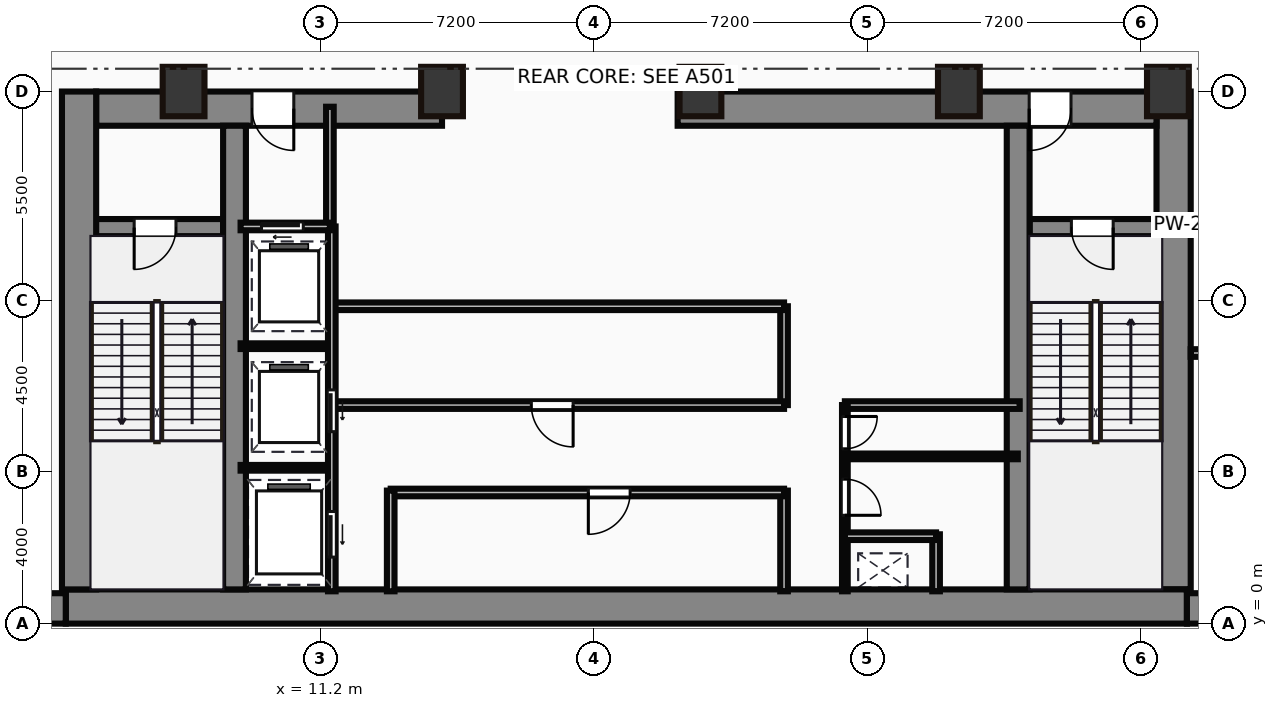
"""IFC4 building model, lengths in metres.
Left out: names, types, materials, properties, quantities, classifications, styles, units other than length and angle.
Written with IfcOpenShell. Run it as: python <this file> out.ifc"""

import sys

from ifc_helpers import new_model, si_unit, direction, frame, frame_2d, origin, origin_2d, place, context, subcontext, project, spatial, rectangle, hollow_rectangle, extrude, source, transform, mapped, element, fill, save


model = new_model("IFC4")
c1 = context("Model", 3, precision=1e-05, world=origin(), true_north=direction((0.0, 1.0)))
c2 = subcontext(c1, "Body", "Model", "MODEL_VIEW")
j1 = project(units=[si_unit("LENGTHUNIT", "METRE"), si_unit("PLANEANGLEUNIT", "RADIAN")], contexts=[c1])
p1 = place(None, origin())
s1 = spatial("IfcSite", under=j1, at=p1, CompositionType="ELEMENT")
p2 = place(p1, origin())
s2 = spatial("IfcBuilding", under=s1, at=p2, CompositionType="ELEMENT")
p3 = place(p2, frame((0.0, 0.0, -5.0)))
s3 = spatial("IfcBuildingStorey", under=s2, at=p3, CompositionType="ELEMENT", Elevation=-5.0)
m1 = source(origin(), c2, "Body", "SweptSolid", [
    extrude(rectangle(XDim=4.5, YDim=0.8, at=frame_2d((2.25, 0.0))), origin(), (0.0, 0.0, 1.0), 5.0),
])
p4 = place(p3, frame((0.0, 0.4, 0.0), z_axis=(0.0, 0.0, 1.0), x_axis=(1.0, 0.0, 0.0)))
e1 = element("IfcWall", 1, at=p4, inside=s3, PredefinedType="USERDEFINED", context=c2, shape_type="MappedRepresentation", body=[
    mapped(m1, transform((0.0, 0.0, 0.0))),
])
m2 = source(origin(), c2, "Body", "SweptSolid", [
    extrude(rectangle(XDim=48.0, YDim=0.8, at=frame_2d((24.0, 0.0))), origin(), (0.0, 0.0, 1.0), 5.0),
])
p5 = place(p3, frame((34.0, 0.4, 0.0), z_axis=(0.0, 0.0, 1.0), x_axis=(1.0, 0.0, 0.0)))
e2 = element("IfcWall", 2, at=p5, inside=s3, PredefinedType="USERDEFINED", context=c2, shape_type="MappedRepresentation", body=[
    mapped(m2, transform((0.0, 0.0, 0.0))),
])
m3 = source(origin(), c2, "Body", "SweptSolid", [
    extrude(rectangle(XDim=29.5, YDim=0.9, at=frame_2d((14.75, 0.0))), origin(), (0.0, 0.0, 1.0), 5.0),
])
p6 = place(p3, frame((4.5, 0.45, 0.0), z_axis=(0.0, 0.0, 1.0), x_axis=(1.0, 0.0, 0.0)))
e3 = element("IfcWall", 3, at=p6, inside=s3, PredefinedType="SHEAR", context=c2, shape_type="MappedRepresentation", body=[
    mapped(m3, transform((0.0, 0.0, 0.0))),
])
m4 = source(origin(), c2, "Body", "SweptSolid", [
    extrude(rectangle(XDim=13.1, YDim=0.9, at=frame_2d((6.55, 0.0))), origin(), (0.0, 0.0, 1.0), 5.0),
])
for number, where, z_axis, x_axis in (
    (4, (4.85, 0.9, 0.0), (0.0, 0.0, 1.0), (0.0, 1.0, 0.0)),
    (5, (33.65, 0.9, 0.0), (0.0, 0.0, 1.0), (0.0, 1.0, 0.0)),
):
    element("IfcWall", number, at=place(p3, frame(where, z_axis=z_axis, x_axis=x_axis)), inside=s3, PredefinedType="SHEAR", context=c2, shape_type="MappedRepresentation", body=[
        mapped(m4, transform((0.0, 0.0, 0.0))),
    ])
m5 = source(origin(), c2, "Body", "SweptSolid", [
    extrude(rectangle(XDim=9.1, YDim=0.9, at=frame_2d((4.55, 0.0))), origin(), (0.0, 0.0, 1.0), 5.0),
])
p7 = place(p3, frame((5.3, 13.55, 0.0), z_axis=(0.0, 0.0, 1.0), x_axis=(1.0, 0.0, 0.0)))
e6 = element("IfcWall", 6, at=p7, inside=s3, PredefinedType="SHEAR", context=c2, shape_type="MappedRepresentation", body=[
    mapped(m5, transform((0.0, 0.0, 0.0))),
])
p8 = place(p7, frame((4.1, 0.0, 0.0)))
e7 = element("IfcOpeningElement", 7, at=p8, cuts=e6, PredefinedType="OPENING", context=c2, shape_type="SweptSolid", body=[
    extrude(rectangle(XDim=1.1, YDim=2.15, at=frame_2d((0.55, 1.075))), frame((0.0, 0.46, 0.0), z_axis=(0.0, -1.0, 0.0), x_axis=(1.0, 0.0, 0.0)), (0.0, 0.0, 1.0), 0.92),
])
m6 = source(origin(), c2, "Body", "SweptSolid", [
    extrude(rectangle(XDim=12.6, YDim=0.9, at=frame_2d((6.3, 0.0))), origin(), (0.0, 0.0, 1.0), 5.0),
])
p9 = place(p3, frame((20.6, 13.55, 0.0), z_axis=(0.0, 0.0, 1.0), x_axis=(1.0, 0.0, 0.0)))
e8 = element("IfcWall", 8, at=p9, inside=s3, PredefinedType="SHEAR", context=c2, shape_type="MappedRepresentation", body=[
    mapped(m6, transform((0.0, 0.0, 0.0))),
])
p10 = place(p9, frame((9.25, 0.0, 0.0)))
e9 = element("IfcOpeningElement", 9, at=p10, cuts=e8, PredefinedType="OPENING", context=c2, shape_type="SweptSolid", body=[
    extrude(rectangle(XDim=1.1, YDim=2.15, at=frame_2d((0.55, 1.075))), frame((0.0, 0.46, 0.0), z_axis=(0.0, -1.0, 0.0), x_axis=(1.0, 0.0, 0.0)), (0.0, 0.0, 1.0), 0.92),
])
m7 = source(origin(), c2, "Body", "SweptSolid", [
    extrude(rectangle(XDim=12.2, YDim=0.6, at=frame_2d((6.1, 0.0))), origin(), (0.0, 0.0, 1.0), 5.0),
])
for number, where, z_axis, x_axis in (
    (10, (8.94, 0.9, 0.0), (0.0, 0.0, 1.0), (0.0, 1.0, 0.0)),
    (11, (29.56, 0.9, 0.0), (0.0, 0.0, 1.0), (0.0, 1.0, 0.0)),
):
    element("IfcWall", number, at=place(p3, frame(where, z_axis=z_axis, x_axis=x_axis)), inside=s3, PredefinedType="SHEAR", context=c2, shape_type="MappedRepresentation", body=[
        mapped(m7, transform((0.0, 0.0, 0.0))),
    ])
m8 = source(origin(), c2, "Body", "SweptSolid", [
    extrude(rectangle(XDim=3.39, YDim=0.45, at=frame_2d((1.695, 0.0))), origin(), (0.0, 0.0, 1.0), 5.0),
])
p11 = place(p3, frame((5.25, 10.42, 0.0), z_axis=(0.0, 0.0, 1.0), x_axis=(1.0, 0.0, 0.0)))
e12 = element("IfcWall", 12, at=p11, inside=s3, PredefinedType="SHEAR", context=c2, shape_type="MappedRepresentation", body=[
    mapped(m8, transform((0.0, 0.0, 0.0))),
])
p12 = place(p11, frame((1.05, 0.0, 0.0)))
e13 = element("IfcOpeningElement", 13, at=p12, cuts=e12, PredefinedType="OPENING", context=c2, shape_type="SweptSolid", body=[
    extrude(rectangle(XDim=1.1, YDim=2.15, at=frame_2d((0.55, 1.075))), frame((0.0, 0.235, 0.0), z_axis=(0.0, -1.0, 0.0), x_axis=(1.0, 0.0, 0.0)), (0.0, 0.0, 1.0), 0.47),
])
p13 = place(p3, frame((29.86, 10.42, 0.0), z_axis=(0.0, 0.0, 1.0), x_axis=(1.0, 0.0, 0.0)))
e14 = element("IfcWall", 14, at=p13, inside=s3, PredefinedType="SHEAR", context=c2, shape_type="MappedRepresentation", body=[
    mapped(m8, transform((0.0, 0.0, 0.0))),
])
p14 = place(p13, frame((1.1, 0.0, 0.0)))
e15 = element("IfcOpeningElement", 15, at=p14, cuts=e14, PredefinedType="OPENING", context=c2, shape_type="SweptSolid", body=[
    extrude(rectangle(XDim=1.1, YDim=2.15, at=frame_2d((0.55, 1.075))), frame((0.0, 0.235, 0.0), z_axis=(0.0, -1.0, 0.0), x_axis=(1.0, 0.0, 0.0)), (0.0, 0.0, 1.0), 0.47),
])
m9 = source(origin(), c2, "Body", "SweptSolid", [
    extrude(hollow_rectangle(XDim=1.1, YDim=1.3, WallThickness=0.055, at=origin_2d()), origin(), (0.0, 0.0, 1.0), 5.0),
])
for number, where, z_axis, x_axis in (
    (16, (7.6, 14.0, 0.0), (0.0, 0.0, 1.0), (1.0, 0.0, 0.0)),
    (17, (14.4, 14.0, 0.0), (0.0, 0.0, 1.0), (1.0, 0.0, 0.0)),
    (18, (21.2, 14.0, 0.0), (0.0, 0.0, 1.0), (1.0, 0.0, 0.0)),
    (19, (28.0, 14.0, 0.0), (0.0, 0.0, 1.0), (1.0, 0.0, 0.0)),
    (20, (33.5, 14.0, 0.0), (0.0, 0.0, 1.0), (1.0, 0.0, 0.0)),
):
    element("IfcColumn", number, at=place(p3, frame(where, z_axis=z_axis, x_axis=x_axis)), inside=s3, PredefinedType="PILASTER", context=c2, shape_type="MappedRepresentation", body=[
        mapped(m9, transform((0.0, 0.0, 0.0))),
    ])
m10 = source(origin(), c2, "Body", "SweptSolid", [
    extrude(rectangle(XDim=3.18, YDim=0.2, at=frame_2d((1.59, 0.0))), origin(), (0.0, 0.0, 1.0), 4.7),
])
p15 = place(p3, frame((11.45, 10.42, 0.0), z_axis=(0.0, 0.0, 1.0), x_axis=(0.0, 1.0, 0.0)))
e21 = element("IfcWall", 21, at=p15, inside=s3, PredefinedType="PARTITIONING", context=c2, shape_type="MappedRepresentation", body=[
    mapped(m10, transform((0.0, 0.0, 0.0))),
])
m11 = source(origin(), c2, "Body", "SweptSolid", [
    extrude(rectangle(XDim=2.35, YDim=0.2, at=frame_2d((1.175, 0.0))), origin(), (0.0, 0.0, 1.0), 4.7),
])
p16 = place(p3, frame((9.1, 10.45, 0.0), z_axis=(0.0, 0.0, 1.0), x_axis=(1.0, 0.0, 0.0)))
e22 = element("IfcWall", 22, at=p16, inside=s3, PredefinedType="PARTITIONING", context=c2, shape_type="MappedRepresentation", body=[
    mapped(m11, transform((0.0, 0.0, 0.0))),
])
p17 = place(p16, frame((0.55, 0.0, 0.0)))
e23 = element("IfcOpeningElement", 23, at=p17, cuts=e22, PredefinedType="OPENING", context=c2, shape_type="SweptSolid", body=[
    extrude(rectangle(XDim=1.1, YDim=2.15, at=frame_2d((0.55, 1.075))), frame((0.0, 0.11, 0.0), z_axis=(0.0, -1.0, 0.0), x_axis=(1.0, 0.0, 0.0)), (0.0, 0.0, 1.0), 0.22),
])
m12 = source(origin(), c2, "Body", "SweptSolid", [
    extrude(rectangle(XDim=9.6, YDim=0.2, at=frame_2d((4.8, 0.0))), origin(), (0.0, 0.0, 1.0), 4.7),
])
p18 = place(p3, frame((11.5, 0.85, 0.0), z_axis=(0.0, 0.0, 1.0), x_axis=(0.0, 1.0, 0.0)))
e24 = element("IfcWall", 24, at=p18, inside=s3, PredefinedType="PARTITIONING", context=c2, shape_type="MappedRepresentation", body=[
    mapped(m12, transform((0.0, 0.0, 0.0))),
])
p19 = place(p18, frame((4.2, 0.0, 0.0)))
e25 = element("IfcOpeningElement", 25, at=p19, cuts=e24, PredefinedType="OPENING", context=c2, shape_type="SweptSolid", body=[
    extrude(rectangle(XDim=1.1, YDim=2.15, at=frame_2d((0.55, 1.075))), frame((0.0, 0.11, 0.0), z_axis=(0.0, -1.0, 0.0), x_axis=(1.0, 0.0, 0.0)), (0.0, 0.0, 1.0), 0.22),
])
p20 = place(p18, frame((0.9, 0.0, 0.0)))
e26 = element("IfcOpeningElement", 26, at=p20, cuts=e24, PredefinedType="OPENING", context=c2, shape_type="SweptSolid", body=[
    extrude(rectangle(XDim=1.2, YDim=2.15, at=frame_2d((0.6, 1.075))), frame((0.0, 0.11, 0.0), z_axis=(0.0, -1.0, 0.0), x_axis=(1.0, 0.0, 0.0)), (0.0, 0.0, 1.0), 0.22),
])
m13 = source(origin(), c2, "Body", "SweptSolid", [
    extrude(rectangle(XDim=2.4, YDim=0.15, at=frame_2d((1.2, 0.0))), origin(), (0.0, 0.0, 1.0), 4.7),
])
for number, where, z_axis, x_axis in (
    (27, (9.1, 4.1, 0.0), (0.0, 0.0, 1.0), (1.0, 0.0, 0.0)),
    (28, (9.1, 7.3, 0.0), (0.0, 0.0, 1.0), (1.0, 0.0, 0.0)),
):
    element("IfcWall", number, at=place(p3, frame(where, z_axis=z_axis, x_axis=x_axis)), inside=s3, PredefinedType="PARTITIONING", context=c2, shape_type="MappedRepresentation", body=[
        mapped(m13, transform((0.0, 0.0, 0.0))),
    ])
m14 = source(origin(), c2, "Body", "SweptSolid", [
    extrude(rectangle(XDim=2.65, YDim=0.2, at=frame_2d((1.325, 0.0))), origin(), (0.0, 0.0, 1.0), 4.7),
])
p21 = place(p3, frame((13.05, 0.85, 0.0), z_axis=(0.0, 0.0, 1.0), x_axis=(0.0, 1.0, 0.0)))
e29 = element("IfcWall", 29, at=p21, inside=s3, PredefinedType="PARTITIONING", context=c2, shape_type="MappedRepresentation", body=[
    mapped(m14, transform((0.0, 0.0, 0.0))),
])
m15 = source(origin(), c2, "Body", "SweptSolid", [
    extrude(rectangle(XDim=10.35, YDim=0.2, at=frame_2d((5.175, 0.0))), origin(), (0.0, 0.0, 1.0), 4.7),
])
p22 = place(p3, frame((13.05, 3.45, 0.0), z_axis=(0.0, 0.0, 1.0), x_axis=(1.0, 0.0, 0.0)))
e30 = element("IfcWall", 30, at=p22, inside=s3, PredefinedType="PARTITIONING", context=c2, shape_type="MappedRepresentation", body=[
    mapped(m15, transform((0.0, 0.0, 0.0))),
])
p23 = place(p22, frame((5.2, 0.0, 0.0)))
e31 = element("IfcOpeningElement", 31, at=p23, cuts=e30, PredefinedType="OPENING", context=c2, shape_type="SweptSolid", body=[
    extrude(rectangle(XDim=1.1, YDim=2.15, at=frame_2d((0.55, 1.075))), frame((0.0, 0.11, 0.0), z_axis=(0.0, -1.0, 0.0), x_axis=(1.0, 0.0, 0.0)), (0.0, 0.0, 1.0), 0.22),
])
p24 = place(p3, frame((23.4, 0.85, 0.0), z_axis=(0.0, 0.0, 1.0), x_axis=(0.0, 1.0, 0.0)))
e32 = element("IfcWall", 32, at=p24, inside=s3, PredefinedType="PARTITIONING", context=c2, shape_type="MappedRepresentation", body=[
    mapped(m14, transform((0.0, 0.0, 0.0))),
])
m16 = source(origin(), c2, "Body", "SweptSolid", [
    extrude(rectangle(XDim=11.85, YDim=0.2, at=frame_2d((5.925, 0.0))), origin(), (0.0, 0.0, 1.0), 4.7),
])
p25 = place(p3, frame((11.55, 5.75, 0.0), z_axis=(0.0, 0.0, 1.0), x_axis=(1.0, 0.0, 0.0)))
e33 = element("IfcWall", 33, at=p25, inside=s3, PredefinedType="PARTITIONING", context=c2, shape_type="MappedRepresentation", body=[
    mapped(m16, transform((0.0, 0.0, 0.0))),
])
p26 = place(p25, frame((5.2, 0.0, 0.0)))
e34 = element("IfcOpeningElement", 34, at=p26, cuts=e33, PredefinedType="OPENING", context=c2, shape_type="SweptSolid", body=[
    extrude(rectangle(XDim=1.1, YDim=2.15, at=frame_2d((0.55, 1.075))), frame((0.0, 0.11, 0.0), z_axis=(0.0, -1.0, 0.0), x_axis=(1.0, 0.0, 0.0)), (0.0, 0.0, 1.0), 0.22),
])
p27 = place(p3, frame((11.55, 8.35, 0.0), z_axis=(0.0, 0.0, 1.0), x_axis=(1.0, 0.0, 0.0)))
e35 = element("IfcWall", 35, at=p27, inside=s3, PredefinedType="PARTITIONING", context=c2, shape_type="MappedRepresentation", body=[
    mapped(m16, transform((0.0, 0.0, 0.0))),
])
m17 = source(origin(), c2, "Body", "SweptSolid", [
    extrude(rectangle(XDim=2.6, YDim=0.2, at=frame_2d((1.3, 0.0))), origin(), (0.0, 0.0, 1.0), 4.7),
])
p28 = place(p3, frame((23.4, 5.75, 0.0), z_axis=(0.0, 0.0, 1.0), x_axis=(0.0, 1.0, 0.0)))
e36 = element("IfcWall", 36, at=p28, inside=s3, PredefinedType="PARTITIONING", context=c2, shape_type="MappedRepresentation", body=[
    mapped(m17, transform((0.0, 0.0, 0.0))),
])
m18 = source(origin(), c2, "Body", "SweptSolid", [
    extrude(rectangle(XDim=4.9, YDim=0.15, at=frame_2d((2.45, 0.0))), origin(), (0.0, 0.0, 1.0), 4.7),
])
p29 = place(p3, frame((25.0, 0.85, 0.0), z_axis=(0.0, 0.0, 1.0), x_axis=(0.0, 1.0, 0.0)))
e37 = element("IfcWall", 37, at=p29, inside=s3, PredefinedType="PARTITIONING", context=c2, shape_type="MappedRepresentation", body=[
    mapped(m18, transform((0.0, 0.0, 0.0))),
])
p30 = place(p29, frame((2.0, 0.0, 0.0)))
e38 = element("IfcOpeningElement", 38, at=p30, cuts=e37, PredefinedType="OPENING", context=c2, shape_type="SweptSolid", body=[
    extrude(rectangle(XDim=0.95, YDim=2.15, at=frame_2d((0.475, 1.075))), frame((0.0, 0.085, 0.0), z_axis=(0.0, -1.0, 0.0), x_axis=(1.0, 0.0, 0.0)), (0.0, 0.0, 1.0), 0.17),
])
p31 = place(p29, frame((3.75, 0.0, 0.0)))
e39 = element("IfcOpeningElement", 39, at=p31, cuts=e37, PredefinedType="OPENING", context=c2, shape_type="SweptSolid", body=[
    extrude(rectangle(XDim=0.85, YDim=2.15, at=frame_2d((0.425, 1.075))), frame((0.0, 0.085, 0.0), z_axis=(0.0, -1.0, 0.0), x_axis=(1.0, 0.0, 0.0)), (0.0, 0.0, 1.0), 0.17),
])
m19 = source(origin(), c2, "Body", "SweptSolid", [
    extrude(rectangle(XDim=4.6, YDim=0.2, at=frame_2d((2.3, 0.0))), origin(), (0.0, 0.0, 1.0), 4.7),
])
p32 = place(p3, frame((25.0, 5.75, 0.0), z_axis=(0.0, 0.0, 1.0), x_axis=(1.0, 0.0, 0.0)))
e40 = element("IfcWall", 40, at=p32, inside=s3, PredefinedType="PARTITIONING", context=c2, shape_type="MappedRepresentation", body=[
    mapped(m19, transform((0.0, 0.0, 0.0))),
])
m20 = source(origin(), c2, "Body", "SweptSolid", [
    extrude(rectangle(XDim=2.4, YDim=0.2, at=frame_2d((1.2, 0.0))), origin(), (0.0, 0.0, 1.0), 4.7),
])
p33 = place(p3, frame((25.0, 2.3, 0.0), z_axis=(0.0, 0.0, 1.0), x_axis=(1.0, 0.0, 0.0)))
e41 = element("IfcWall", 41, at=p33, inside=s3, PredefinedType="PARTITIONING", context=c2, shape_type="MappedRepresentation", body=[
    mapped(m20, transform((0.0, 0.0, 0.0))),
])
m21 = source(origin(), c2, "Body", "SweptSolid", [
    extrude(rectangle(XDim=1.5, YDim=0.2, at=frame_2d((0.75, 0.0))), origin(), (0.0, 0.0, 1.0), 4.7),
])
p34 = place(p3, frame((27.4, 0.85, 0.0), z_axis=(0.0, 0.0, 1.0), x_axis=(0.0, 1.0, 0.0)))
e42 = element("IfcWall", 42, at=p34, inside=s3, PredefinedType="PARTITIONING", context=c2, shape_type="MappedRepresentation", body=[
    mapped(m21, transform((0.0, 0.0, 0.0))),
])
m22 = source(origin(), c2, "Body", "SweptSolid", [
    extrude(rectangle(XDim=4.55, YDim=0.15, at=frame_2d((2.275, 0.0))), origin(), (0.0, 0.0, 1.0), 4.7),
])
p35 = place(p3, frame((25.0, 4.4, 0.0), z_axis=(0.0, 0.0, 1.0), x_axis=(1.0, 0.0, 0.0)))
e43 = element("IfcWall", 43, at=p35, inside=s3, PredefinedType="PARTITIONING", context=c2, shape_type="MappedRepresentation", body=[
    mapped(m22, transform((0.0, 0.0, 0.0))),
])
m23 = source(origin(), c2, "Body", "SweptSolid", [
    extrude(rectangle(XDim=23.85, YDim=0.2, at=frame_2d((11.925, 0.0))), origin(), (0.0, 0.0, 1.0), 4.7),
])
p36 = place(p3, frame((34.1, 7.12, 0.0), z_axis=(0.0, 0.0, 1.0), x_axis=(1.0, 0.0, 0.0)))
e44 = element("IfcWall", 44, at=p36, inside=s3, PredefinedType="PARTITIONING", context=c2, shape_type="MappedRepresentation", body=[
    mapped(m23, transform((0.0, 0.0, 0.0))),
])
p37 = place(p36, frame((10.5, 0.0, 0.0)))
e45 = element("IfcOpeningElement", 45, at=p37, cuts=e44, PredefinedType="OPENING", context=c2, shape_type="SweptSolid", body=[
    extrude(rectangle(XDim=1.1, YDim=2.15, at=frame_2d((0.55, 1.075))), frame((0.0, 0.11, 0.0), z_axis=(0.0, -1.0, 0.0), x_axis=(1.0, 0.0, 0.0)), (0.0, 0.0, 1.0), 0.22),
])
m24 = source(origin(), c2, "Body", "SweptSolid", [
    extrude(rectangle(XDim=1.1, YDim=2.15, at=frame_2d((0.55, 1.075))), frame((0.0, 0.025, 0.0), z_axis=(0.0, -1.0, 0.0), x_axis=(1.0, 0.0, 0.0)), (0.0, 0.0, 1.0), 0.05),
])
p38 = place(p12, frame((1.1, 0.0, 0.0), z_axis=(0.0, 0.0, 1.0), x_axis=(-1.0, 0.0, 0.0)))
e46 = element("IfcDoor", 46, at=p38, inside=s3, OperationType="SINGLE_SWING_LEFT", PredefinedType="DOOR", context=c2, shape_type="MappedRepresentation", body=[
    mapped(m24, transform((0.0, 0.0, 0.0))),
])
fill(e13, e46)
p39 = place(p14, frame((1.1, 0.0, 0.0), z_axis=(0.0, 0.0, 1.0), x_axis=(-1.0, 0.0, 0.0)))
e47 = element("IfcDoor", 47, at=p39, inside=s3, OperationType="SINGLE_SWING_RIGHT", PredefinedType="DOOR", context=c2, shape_type="MappedRepresentation", body=[
    mapped(m24, transform((0.0, 0.0, 0.0))),
])
fill(e15, e47)
p40 = place(p8, origin())
e48 = element("IfcDoor", 48, at=p40, inside=s3, OperationType="SINGLE_SWING_RIGHT", PredefinedType="DOOR", context=c2, shape_type="MappedRepresentation", body=[
    mapped(m24, transform((0.0, 0.0, 0.0))),
])
fill(e7, e48)
p41 = place(p10, origin())
e49 = element("IfcDoor", 49, at=p41, inside=s3, OperationType="SINGLE_SWING_LEFT", PredefinedType="DOOR", context=c2, shape_type="MappedRepresentation", body=[
    mapped(m24, transform((0.0, 0.0, 0.0))),
])
fill(e9, e49)
p42 = place(p17, origin())
e50 = element("IfcDoor", 50, at=p42, inside=s3, OperationType="SLIDING_TO_LEFT", PredefinedType="DOOR", context=c2, shape_type="MappedRepresentation", body=[
    mapped(m24, transform((0.0, 0.0, 0.0))),
])
fill(e23, e50)
p43 = place(p19, frame((1.1, 0.0, 0.0), z_axis=(0.0, 0.0, 1.0), x_axis=(-1.0, 0.0, 0.0)))
e51 = element("IfcDoor", 51, at=p43, inside=s3, OperationType="SLIDING_TO_LEFT", PredefinedType="DOOR", context=c2, shape_type="MappedRepresentation", body=[
    mapped(m24, transform((0.0, 0.0, 0.0))),
])
fill(e25, e51)
m25 = source(origin(), c2, "Body", "SweptSolid", [
    extrude(rectangle(XDim=1.2, YDim=2.15, at=frame_2d((0.6, 1.075))), frame((0.0, 0.025, 0.0), z_axis=(0.0, -1.0, 0.0), x_axis=(1.0, 0.0, 0.0)), (0.0, 0.0, 1.0), 0.05),
])
p44 = place(p20, frame((1.2, 0.0, 0.0), z_axis=(0.0, 0.0, 1.0), x_axis=(-1.0, 0.0, 0.0)))
e52 = element("IfcDoor", 52, at=p44, inside=s3, OperationType="SLIDING_TO_LEFT", PredefinedType="DOOR", context=c2, shape_type="MappedRepresentation", body=[
    mapped(m25, transform((0.0, 0.0, 0.0))),
])
fill(e26, e52)
p45 = place(p23, origin())
e53 = element("IfcDoor", 53, at=p45, inside=s3, OperationType="SINGLE_SWING_LEFT", PredefinedType="DOOR", context=c2, shape_type="MappedRepresentation", body=[
    mapped(m24, transform((0.0, 0.0, 0.0))),
])
fill(e31, e53)
p46 = place(p26, frame((1.1, 0.0, 0.0), z_axis=(0.0, 0.0, 1.0), x_axis=(-1.0, 0.0, 0.0)))
e54 = element("IfcDoor", 54, at=p46, inside=s3, OperationType="SINGLE_SWING_RIGHT", PredefinedType="DOOR", context=c2, shape_type="MappedRepresentation", body=[
    mapped(m24, transform((0.0, 0.0, 0.0))),
])
fill(e34, e54)
m26 = source(origin(), c2, "Body", "SweptSolid", [
    extrude(rectangle(XDim=0.95, YDim=2.15, at=frame_2d((0.475, 1.075))), frame((0.0, 0.025, 0.0), z_axis=(0.0, -1.0, 0.0), x_axis=(1.0, 0.0, 0.0)), (0.0, 0.0, 1.0), 0.05),
])
p47 = place(p30, origin())
e55 = element("IfcDoor", 55, at=p47, inside=s3, OperationType="SINGLE_SWING_LEFT", PredefinedType="DOOR", context=c2, shape_type="MappedRepresentation", body=[
    mapped(m26, transform((0.0, 0.0, 0.0))),
])
fill(e38, e55)
m27 = source(origin(), c2, "Body", "SweptSolid", [
    extrude(rectangle(XDim=0.85, YDim=2.15, at=frame_2d((0.425, 1.075))), frame((0.0, 0.025, 0.0), z_axis=(0.0, -1.0, 0.0), x_axis=(1.0, 0.0, 0.0)), (0.0, 0.0, 1.0), 0.05),
])
p48 = place(p31, origin())
e56 = element("IfcDoor", 56, at=p48, inside=s3, OperationType="SINGLE_SWING_RIGHT", PredefinedType="DOOR", context=c2, shape_type="MappedRepresentation", body=[
    mapped(m27, transform((0.0, 0.0, 0.0))),
])
fill(e39, e56)
save(model, sys.argv[1])
